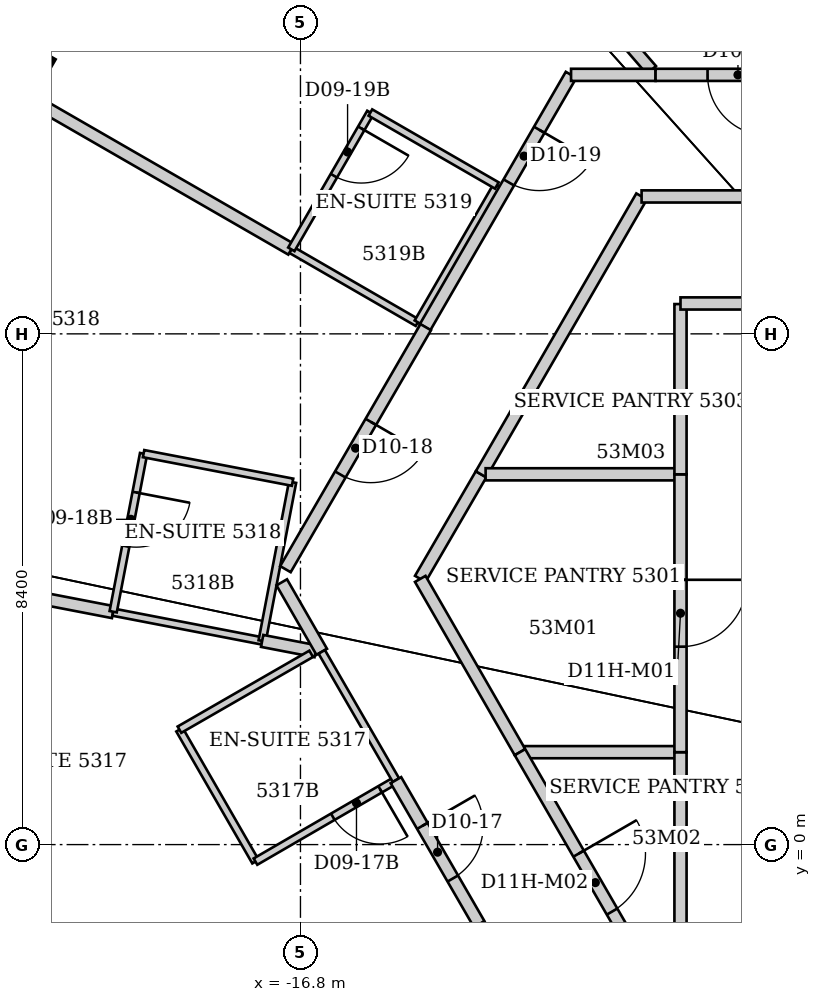
"""IFC4 building model, lengths in metres.
Left out: names, types, materials, properties, quantities, classifications, styles, units other than length and angle.
Written with IfcOpenShell. Run it as: python <this file> out.ifc"""

import sys

from ifc_helpers import new_model, si_unit, direction, frame, frame_2d, origin, origin_2d, place, context, subcontext, project, spatial, rectangle, extrude, element, fill, save


model = new_model("IFC4")
c1 = context("Model", 3, precision=1e-05, world=origin(), true_north=direction((0.0, 1.0)))
c2 = subcontext(c1, "Body", "Model", "MODEL_VIEW")
j1 = project(units=[si_unit("LENGTHUNIT", "METRE"), si_unit("PLANEANGLEUNIT", "RADIAN")], contexts=[c1])
p1 = place(None, origin())
s1 = spatial("IfcSite", under=j1, at=p1, CompositionType="ELEMENT")
p2 = place(p1, origin())
s2 = spatial("IfcBuilding", under=s1, at=p2, CompositionType="ELEMENT")
p3 = place(p2, frame((0.0, 0.0, 213.6)))
s3 = spatial("IfcBuildingStorey", under=s2, at=p3, CompositionType="ELEMENT", Elevation=213.6)
for number, where, z_axis, x_axis in (
    (1, (-21.85, -1.956, 0.0), (0.0, 0.0, 1.0), (-0.866, -0.5, 0.0)),
    (2, (-21.88, 12.633, 0.0), (0.0, 0.0, 1.0), (-0.866, 0.5, 0.0)),
):
    element("IfcColumn", number, at=place(p3, frame(where, z_axis=z_axis, x_axis=x_axis)), inside=s3, PredefinedType="COLUMN", context=c2, shape_type="SweptSolid", body=[
        extrude(rectangle(XDim=1.5, YDim=1.5, at=origin_2d()), origin(), (0.0, 0.0, 1.0), 3.8),
    ])
p4 = place(p3, frame((-27.041, 5.204, 0.0), z_axis=(0.0, 0.0, 1.0), x_axis=(0.981883480928, -0.189485698355, 0.0)))
e3 = element("IfcWall", 3, at=p4, inside=s3, PredefinedType="PARTITIONING", context=c2, shape_type="SweptSolid", body=[
    extrude(rectangle(XDim=7.291, YDim=0.2, at=frame_2d((3.646, 0.0))), origin(), (0.0, 0.0, 1.0), 3.64),
])
p5 = place(p3, frame((-19.881, 3.823, 0.0), z_axis=(0.0, 0.0, 1.0), x_axis=(0.981896775229, -0.189416796496, 0.0)))
e4 = element("IfcWall", 4, at=p5, inside=s3, PredefinedType="PARTITIONING", context=c2, shape_type="SweptSolid", body=[
    extrude(rectangle(XDim=2.497, YDim=0.12, at=frame_2d((1.248, 0.0))), origin(), (0.0, 0.0, 1.0), 3.64),
])
p6 = place(p3, frame((-19.38, 6.43, 0.0), z_axis=(0.0, 0.0, 1.0), x_axis=(-0.18885765444, -0.982004473696, 0.0)))
e5 = element("IfcWall", 5, at=p6, inside=s3, PredefinedType="PARTITIONING", context=c2, shape_type="SweptSolid", body=[
    extrude(rectangle(XDim=2.647, YDim=0.12, at=frame_2d((1.324, 0.0))), origin(), (0.0, 0.0, 1.0), 3.64),
])
p7 = place(p6, frame((0.65, 0.0, 0.0)))
e6 = element("IfcOpeningElement", 6, at=p7, cuts=e5, PredefinedType="OPENING", context=c2, shape_type="SweptSolid", body=[
    extrude(rectangle(XDim=0.9, YDim=2.03, at=frame_2d((0.45, 1.015))), frame((0.0, 0.06, 0.0), z_axis=(0.0, -1.0, 0.0), x_axis=(1.0, 0.0, 0.0)), (0.0, 0.0, 1.0), 0.12),
])
p8 = place(p3, frame((-18.79, 1.89, 0.0), z_axis=(0.0, 0.0, 1.0), x_axis=(0.499159685399, -0.866510016372, 0.0)))
e7 = element("IfcWall", 7, at=p8, inside=s3, PredefinedType="PARTITIONING", context=c2, shape_type="SweptSolid", body=[
    extrude(rectangle(XDim=2.504, YDim=0.12, at=frame_2d((1.252, 0.0))), origin(), (0.0, 0.0, 1.0), 3.64),
])
p9 = place(p3, frame((-17.54, -0.28, 0.0), z_axis=(0.0, 0.0, 1.0), x_axis=(0.86498992408, 0.501789229896, 0.0)))
e8 = element("IfcWall", 8, at=p9, inside=s3, PredefinedType="PARTITIONING", context=c2, shape_type="SweptSolid", body=[
    extrude(rectangle(XDim=2.671, YDim=0.12, at=frame_2d((1.335, 0.0))), origin(), (0.0, 0.0, 1.0), 3.64),
])
p10 = place(p9, frame((1.47, 0.0, 0.0)))
e9 = element("IfcOpeningElement", 9, at=p10, cuts=e8, PredefinedType="OPENING", context=c2, shape_type="SweptSolid", body=[
    extrude(rectangle(XDim=0.9, YDim=2.03, at=frame_2d((0.45, 1.015))), frame((0.0, 0.06, 0.0), z_axis=(0.0, -1.0, 0.0), x_axis=(1.0, 0.0, 0.0)), (0.0, 0.0, 1.0), 0.12),
])
p11 = place(p3, frame((-17.43, 3.35, 0.0), z_axis=(0.0, 0.0, 1.0), x_axis=(0.188159009227, 0.982138578433, 0.0)))
e10 = element("IfcWall", 10, at=p11, inside=s3, PredefinedType="PARTITIONING", context=c2, shape_type="SweptSolid", body=[
    extrude(rectangle(XDim=2.657, YDim=0.12, at=frame_2d((1.329, 0.0))), origin(), (0.0, 0.0, 1.0), 3.64),
])
p12 = place(p3, frame((-17.43, 3.35, 0.0), z_axis=(0.0, 0.0, 1.0), x_axis=(0.981858463983, -0.189615286052, 0.0)))
e11 = element("IfcWall", 11, at=p12, inside=s3, PredefinedType="PARTITIONING", context=c2, shape_type="SweptSolid", body=[
    extrude(rectangle(XDim=0.896, YDim=0.2, at=frame_2d((0.448, 0.0))), origin(), (0.0, 0.0, 1.0), 3.64),
])
p13 = place(p3, frame((-17.108, 4.314, 0.0), z_axis=(0.0, 0.0, 1.0), x_axis=(0.498488506644, -0.866896307954, 0.0)))
e12 = element("IfcWall", 12, at=p13, inside=s3, PredefinedType="PARTITIONING", context=c2, shape_type="SweptSolid", body=[
    extrude(rectangle(XDim=1.319, YDim=0.2, at=frame_2d((0.66, 0.0))), origin(), (0.0, 0.0, 1.0), 3.64),
])
p14 = place(p3, frame((-16.954, 9.783, 0.0), z_axis=(0.0, 0.0, 1.0), x_axis=(0.865862137391, -0.500282679124, 0.0)))
e13 = element("IfcWall", 13, at=p14, inside=s3, PredefinedType="PARTITIONING", context=c2, shape_type="SweptSolid", body=[
    extrude(rectangle(XDim=2.401, YDim=0.12, at=frame_2d((1.201, 0.0))), origin(), (0.0, 0.0, 1.0), 2.878),
])
p15 = place(p3, frame((-16.95, 9.79, 0.0), z_axis=(0.0, 0.0, 1.0), x_axis=(-0.866371236465, 0.499400521251, 0.0)))
e14 = element("IfcWall", 14, at=p15, inside=s3, PredefinedType="PARTITIONING", context=c2, shape_type="SweptSolid", body=[
    extrude(rectangle(XDim=6.829, YDim=0.2, at=frame_2d((3.414, 0.0))), origin(), (0.0, 0.0, 1.0), 2.878),
])
p16 = place(p3, frame((-16.93, 5.96, 0.0), z_axis=(0.0, 0.0, 1.0), x_axis=(-0.982097071605, 0.18837553436, 0.0)))
e15 = element("IfcWall", 15, at=p16, inside=s3, PredefinedType="PARTITIONING", context=c2, shape_type="SweptSolid", body=[
    extrude(rectangle(XDim=2.495, YDim=0.12, at=frame_2d((1.248, 0.0))), origin(), (0.0, 0.0, 1.0), 3.64),
])
p17 = place(p3, frame((-16.624, 3.138, 0.0), z_axis=(0.0, 0.0, 1.0), x_axis=(-0.866525185869, -0.499133351175, 0.0)))
e16 = element("IfcWall", 16, at=p17, inside=s3, PredefinedType="PARTITIONING", context=c2, shape_type="SweptSolid", body=[
    extrude(rectangle(XDim=2.5, YDim=0.12, at=frame_2d((1.25, 0.0))), origin(), (0.0, 0.0, 1.0), 3.038),
])
p18 = place(p3, frame((-16.45, 3.17, 0.0), z_axis=(0.0, 0.0, 1.0), x_axis=(0.500566296323, -0.865698205488, 0.0)))
e17 = element("IfcWall", 17, at=p18, inside=s3, PredefinedType="PARTITIONING", context=c2, shape_type="SweptSolid", body=[
    extrude(rectangle(XDim=2.437, YDim=0.12, at=frame_2d((1.219, 0.0))), origin(), (0.0, 0.0, 1.0), 3.64),
])
p19 = place(p3, frame((-16.13, -2.62, 0.0), z_axis=(0.0, 0.0, 1.0), x_axis=(0.866114241029, 0.499846097802, 0.0)))
e18 = element("IfcWall", 18, at=p19, inside=s3, PredefinedType="PARTITIONING", context=c2, shape_type="SweptSolid", body=[
    extrude(rectangle(XDim=2.621, YDim=0.12, at=frame_2d((1.311, 0.0))), origin(), (0.0, 0.0, 1.0), 3.64),
])
p20 = place(p3, frame((-15.65, 12.04, 0.0), z_axis=(0.0, 0.0, 1.0), x_axis=(-0.500291685314, -0.865856933682, 0.0)))
e19 = element("IfcWall", 19, at=p20, inside=s3, PredefinedType="PARTITIONING", context=c2, shape_type="SweptSolid", body=[
    extrude(rectangle(XDim=2.599, YDim=0.12, at=frame_2d((1.299, 0.0))), origin(), (0.0, 0.0, 1.0), 3.64),
])
p21 = place(p20, frame((0.3, 0.0, 0.0)))
e20 = element("IfcOpeningElement", 20, at=p21, cuts=e19, PredefinedType="OPENING", context=c2, shape_type="SweptSolid", body=[
    extrude(rectangle(XDim=0.9, YDim=2.03, at=frame_2d((0.45, 1.015))), frame((0.0, 0.06, 0.0), z_axis=(0.0, -1.0, 0.0), x_axis=(1.0, 0.0, 0.0)), (0.0, 0.0, 1.0), 0.12),
])
p22 = place(p3, frame((-15.23, 1.06, 0.0), z_axis=(0.0, 0.0, 1.0), x_axis=(0.500406860043, -0.865790375565, 0.0)))
e21 = element("IfcWall", 21, at=p22, inside=s3, PredefinedType="PARTITIONING", context=c2, shape_type="SweptSolid", body=[
    extrude(rectangle(XDim=2.738, YDim=0.2, at=frame_2d((1.369, 0.0))), origin(), (0.0, 0.0, 1.0), 3.64),
])
p23 = place(p22, frame((0.869, 0.0, 0.0)))
e22 = element("IfcOpeningElement", 22, at=p23, cuts=e21, PredefinedType="OPENING", context=c2, shape_type="SweptSolid", body=[
    extrude(rectangle(XDim=1.0, YDim=2.13, at=frame_2d((0.5, 1.065))), frame((0.0, 0.1, 0.0), z_axis=(0.0, -1.0, 0.0), x_axis=(1.0, 0.0, 0.0)), (0.0, 0.0, 1.0), 0.2),
])
p24 = place(p3, frame((-14.87, 8.59, 0.0), z_axis=(0.0, 0.0, 1.0), x_axis=(0.500291685314, 0.865856933682, 0.0)))
e23 = element("IfcWall", 23, at=p24, inside=s3, PredefinedType="PARTITIONING", context=c2, shape_type="SweptSolid", body=[
    extrude(rectangle(XDim=2.599, YDim=0.12, at=frame_2d((1.299, 0.0))), origin(), (0.0, 0.0, 1.0), 3.64),
])
p25 = place(p3, frame((-14.83, 4.37, 0.0), z_axis=(0.0, 0.0, 1.0), x_axis=(0.502626855825, 0.864503466623, 0.0)))
e24 = element("IfcWall", 24, at=p25, inside=s3, PredefinedType="PARTITIONING", context=c2, shape_type="SweptSolid", body=[
    extrude(rectangle(XDim=1.99, YDim=0.2, at=frame_2d((0.995, 0.0))), origin(), (0.0, 0.0, 1.0), 3.64),
])
p26 = place(p3, frame((-14.827, 8.554, 0.0), z_axis=(0.0, 0.0, 1.0), x_axis=(0.865865073245, -0.500277597875, 0.0)))
e25 = element("IfcWall", 25, at=p26, inside=s3, PredefinedType="PARTITIONING", context=c2, shape_type="SweptSolid", body=[
    extrude(rectangle(XDim=0.089, YDim=0.2, at=frame_2d((0.044, 0.0))), origin(), (0.0, 0.0, 1.0), 3.64),
])
p27 = place(p3, frame((-14.75, 8.51, 0.0), z_axis=(0.0, 0.0, 1.0), x_axis=(0.500618647881, 0.86566793252, 0.0)))
e26 = element("IfcWall", 26, at=p27, inside=s3, PredefinedType="PARTITIONING", context=c2, shape_type="SweptSolid", body=[
    extrude(rectangle(XDim=4.794, YDim=0.2, at=frame_2d((2.397, 0.0))), origin(), (0.0, 0.0, 1.0), 3.64),
])
p28 = place(p27, frame((2.75, 0.0, 0.0)))
e27 = element("IfcOpeningElement", 27, at=p28, cuts=e26, PredefinedType="OPENING", context=c2, shape_type="SweptSolid", body=[
    extrude(rectangle(XDim=1.0, YDim=2.13, at=frame_2d((0.5, 1.065))), frame((0.0, 0.1, 0.0), z_axis=(0.0, -1.0, 0.0), x_axis=(1.0, 0.0, 0.0)), (0.0, 0.0, 1.0), 0.2),
])
p29 = place(p3, frame((-14.74, 8.51, 0.0), z_axis=(0.0, 0.0, 1.0), x_axis=(-0.501513165407, -0.865150012959, 0.0)))
e28 = element("IfcWall", 28, at=p29, inside=s3, PredefinedType="PARTITIONING", context=c2, shape_type="SweptSolid", body=[
    extrude(rectangle(XDim=4.6, YDim=0.2, at=frame_2d((2.3, 0.0))), origin(), (0.0, 0.0, 1.0), 3.64),
])
p30 = place(p29, frame((1.8, 0.0, 0.0)))
e29 = element("IfcOpeningElement", 29, at=p30, cuts=e28, PredefinedType="OPENING", context=c2, shape_type="SweptSolid", body=[
    extrude(rectangle(XDim=1.0, YDim=2.13, at=frame_2d((0.5, 1.065))), frame((0.0, 0.1, 0.0), z_axis=(0.0, -1.0, 0.0), x_axis=(1.0, 0.0, 0.0)), (0.0, 0.0, 1.0), 0.2),
])
p31 = place(p3, frame((-13.83, 6.09, 0.0), z_axis=(0.0, 0.0, 1.0), x_axis=(0.500248310865, 0.865881993967, 0.0)))
e30 = element("IfcWall", 30, at=p31, inside=s3, PredefinedType="PARTITIONING", context=c2, shape_type="SweptSolid", body=[
    extrude(rectangle(XDim=5.278, YDim=0.2, at=frame_2d((2.639, 0.0))), origin(), (0.0, 0.0, 1.0), 3.64),
])
p32 = place(p3, frame((-13.755, 6.09, 0.0), z_axis=(0.0, 0.0, 1.0), x_axis=(1.0, 0.0, 0.0)))
e31 = element("IfcWall", 31, at=p32, inside=s3, PredefinedType="PARTITIONING", context=c2, shape_type="SweptSolid", body=[
    extrude(rectangle(XDim=3.195, YDim=0.2, at=frame_2d((1.597, 0.0))), origin(), (0.0, 0.0, 1.0), 3.64),
])
p33 = place(p3, frame((-13.57, 10.84, 0.0), z_axis=(0.0, 0.0, 1.0), x_axis=(-0.866177122335, 0.499737123639, 0.0)))
e32 = element("IfcWall", 32, at=p33, inside=s3, PredefinedType="PARTITIONING", context=c2, shape_type="SweptSolid", body=[
    extrude(rectangle(XDim=2.401, YDim=0.12, at=frame_2d((1.201, 0.0))), origin(), (0.0, 0.0, 1.0), 3.64),
])
p34 = place(p3, frame((-13.19, 1.52, 0.0), z_axis=(0.0, 0.0, 1.0), x_axis=(-0.498775186059, 0.866731396554, 0.0)))
e33 = element("IfcWall", 33, at=p34, inside=s3, PredefinedType="PARTITIONING", context=c2, shape_type="SweptSolid", body=[
    extrude(rectangle(XDim=3.288, YDim=0.2, at=frame_2d((1.644, 0.0))), origin(), (0.0, 0.0, 1.0), 3.64),
])
p35 = place(p3, frame((-11.19, 10.66, 0.0), z_axis=(0.0, 0.0, 1.0), x_axis=(1.0, 0.0, 0.0)))
e34 = element("IfcWall", 34, at=p35, inside=s3, PredefinedType="PARTITIONING", context=c2, shape_type="SweptSolid", body=[
    extrude(rectangle(XDim=6.59, YDim=0.2, at=frame_2d((3.295, 0.0))), origin(), (0.0, 0.0, 1.0), 3.64),
])
p36 = place(p35, frame((2.745, 0.0, 0.0)))
e35 = element("IfcOpeningElement", 35, at=p36, cuts=e34, PredefinedType="OPENING", context=c2, shape_type="SweptSolid", body=[
    extrude(rectangle(XDim=1.1, YDim=2.2, at=frame_2d((0.55, 1.1))), frame((0.0, 0.1, 0.0), z_axis=(0.0, -1.0, 0.0), x_axis=(1.0, 0.0, 0.0)), (0.0, 0.0, 1.0), 0.2),
])
p37 = place(p3, frame((-11.029, 12.74, 0.0), z_axis=(0.0, 0.0, 1.0), x_axis=(-0.654429261747, 0.756123231603, 0.0)))
e36 = element("IfcWall", 36, at=p37, inside=s3, PredefinedType="PARTITIONING", context=c2, shape_type="SweptSolid", body=[
    extrude(rectangle(XDim=10.683, YDim=0.2, at=frame_2d((5.342, 0.0))), origin(), (0.0, 0.0, 1.0), 3.64),
])
p38 = place(p3, frame((-10.96, 12.66, 0.0), z_axis=(0.0, 0.0, 1.0), x_axis=(-1.0, 0.0, 0.0)))
e37 = element("IfcWall", 37, at=p38, inside=s3, PredefinedType="PARTITIONING", context=c2, shape_type="SweptSolid", body=[
    extrude(rectangle(XDim=1.39, YDim=0.2, at=frame_2d((0.695, 0.0))), origin(), (0.0, 0.0, 1.0), 3.64),
])
p39 = place(p3, frame((-10.56, 1.52, 0.0), z_axis=(0.0, 0.0, 1.0), x_axis=(-1.0, 0.0, 0.0)))
e38 = element("IfcWall", 38, at=p39, inside=s3, PredefinedType="PARTITIONING", context=c2, shape_type="SweptSolid", body=[
    extrude(rectangle(XDim=2.56, YDim=0.2, at=frame_2d((1.28, 0.0))), origin(), (0.0, 0.0, 1.0), 3.64),
])
p40 = place(p3, frame((-10.55, -3.05, 0.0), z_axis=(0.0, 0.0, 1.0), x_axis=(-0.500193590286, 0.865913605527, 0.0)))
e39 = element("IfcWall", 39, at=p40, inside=s3, PredefinedType="PARTITIONING", context=c2, shape_type="SweptSolid", body=[
    extrude(rectangle(XDim=5.278, YDim=0.2, at=frame_2d((2.639, 0.0))), origin(), (0.0, 0.0, 1.0), 3.64),
])
p41 = place(p40, frame((2.25, 0.0, 0.0)))
e40 = element("IfcOpeningElement", 40, at=p41, cuts=e39, PredefinedType="OPENING", context=c2, shape_type="SweptSolid", body=[
    extrude(rectangle(XDim=1.1, YDim=2.2, at=frame_2d((0.55, 1.1))), frame((0.0, 0.1, 0.0), z_axis=(0.0, -1.0, 0.0), x_axis=(1.0, 0.0, 0.0)), (0.0, 0.0, 1.0), 0.2),
])
p42 = place(p3, frame((-10.55, 1.52, 0.0), z_axis=(0.0, 0.0, 1.0), x_axis=(0.0, -1.0, 0.0)))
e41 = element("IfcWall", 41, at=p42, inside=s3, PredefinedType="PARTITIONING", context=c2, shape_type="SweptSolid", body=[
    extrude(rectangle(XDim=4.375, YDim=0.2, at=frame_2d((2.188, 0.0))), origin(), (0.0, 0.0, 1.0), 3.64),
])
p43 = place(p3, frame((-10.55, 6.09, 0.0), z_axis=(0.0, 0.0, 1.0), x_axis=(0.0, -1.0, 0.0)))
e42 = element("IfcWall", 42, at=p43, inside=s3, PredefinedType="PARTITIONING", context=c2, shape_type="SweptSolid", body=[
    extrude(rectangle(XDim=4.57, YDim=0.2, at=frame_2d((2.285, 0.0))), origin(), (0.0, 0.0, 1.0), 3.64),
])
p44 = place(p43, frame((1.735, 0.0, 0.0)))
e43 = element("IfcOpeningElement", 43, at=p44, cuts=e42, PredefinedType="OPENING", context=c2, shape_type="SweptSolid", body=[
    extrude(rectangle(XDim=1.1, YDim=2.2, at=frame_2d((0.55, 1.1))), frame((0.0, 0.1, 0.0), z_axis=(0.0, -1.0, 0.0), x_axis=(1.0, 0.0, 0.0)), (0.0, 0.0, 1.0), 0.2),
])
p45 = place(p3, frame((-10.55, 8.89, 0.0), z_axis=(0.0, 0.0, 1.0), x_axis=(0.0, -1.0, 0.0)))
e44 = element("IfcWall", 44, at=p45, inside=s3, PredefinedType="PARTITIONING", context=c2, shape_type="SweptSolid", body=[
    extrude(rectangle(XDim=2.8, YDim=0.2, at=frame_2d((1.4, 0.0))), origin(), (0.0, 0.0, 1.0), 3.64),
])
p46 = place(p3, frame((-8.25, 12.66, 0.0), z_axis=(0.0, 0.0, 1.0), x_axis=(-1.0, 0.0, 0.0)))
e45 = element("IfcWall", 45, at=p46, inside=s3, PredefinedType="PARTITIONING", context=c2, shape_type="SweptSolid", body=[
    extrude(rectangle(XDim=2.71, YDim=0.2, at=frame_2d((1.355, 0.0))), origin(), (0.0, 0.0, 1.0), 3.64),
])
p47 = place(p46, frame((0.855, 0.0, 0.0)))
e46 = element("IfcOpeningElement", 46, at=p47, cuts=e45, PredefinedType="OPENING", context=c2, shape_type="SweptSolid", body=[
    extrude(rectangle(XDim=1.0, YDim=2.13, at=frame_2d((0.5, 1.065))), frame((0.0, 0.1, 0.0), z_axis=(0.0, -1.0, 0.0), x_axis=(1.0, 0.0, 0.0)), (0.0, 0.0, 1.0), 0.2),
])
p48 = place(p3, frame((-4.6, 8.9, 0.0), z_axis=(0.0, 0.0, 1.0), x_axis=(-1.0, 0.0, 0.0)))
e47 = element("IfcWall", 47, at=p48, inside=s3, PredefinedType="PARTITIONING", context=c2, shape_type="SweptSolid", body=[
    extrude(rectangle(XDim=5.95, YDim=0.2, at=frame_2d((2.975, 0.0))), origin(), (0.0, 0.0, 1.0), 3.64),
])
p49 = place(p47, origin())
e48 = element("IfcDoor", 48, at=p49, inside=s3, OperationType="SINGLE_SWING_LEFT", PredefinedType="DOOR", context=c2, shape_type="SweptSolid", body=[
    extrude(rectangle(XDim=1.0, YDim=2.13, at=frame_2d((0.5, 1.065))), frame((0.0, 0.025, 0.0), z_axis=(0.0, -1.0, 0.0), x_axis=(1.0, 0.0, 0.0)), (0.0, 0.0, 1.0), 0.05),
])
fill(e46, e48)
p50 = place(p23, origin())
e49 = element("IfcDoor", 49, at=p50, inside=s3, OperationType="SINGLE_SWING_LEFT", PredefinedType="DOOR", context=c2, shape_type="SweptSolid", body=[
    extrude(rectangle(XDim=1.0, YDim=2.13, at=frame_2d((0.5, 1.065))), frame((0.0, 0.025, 0.0), z_axis=(0.0, -1.0, 0.0), x_axis=(1.0, 0.0, 0.0)), (0.0, 0.0, 1.0), 0.05),
])
fill(e22, e49)
p51 = place(p10, origin())
e50 = element("IfcDoor", 50, at=p51, inside=s3, OperationType="SINGLE_SWING_RIGHT", PredefinedType="DOOR", context=c2, shape_type="SweptSolid", body=[
    extrude(rectangle(XDim=0.9, YDim=2.03, at=frame_2d((0.45, 1.015))), frame((0.0, 0.025, 0.0), z_axis=(0.0, -1.0, 0.0), x_axis=(1.0, 0.0, 0.0)), (0.0, 0.0, 1.0), 0.05),
])
fill(e9, e50)
p52 = place(p30, origin())
e51 = element("IfcDoor", 51, at=p52, inside=s3, OperationType="SINGLE_SWING_LEFT", PredefinedType="DOOR", context=c2, shape_type="SweptSolid", body=[
    extrude(rectangle(XDim=1.0, YDim=2.13, at=frame_2d((0.5, 1.065))), frame((0.0, 0.025, 0.0), z_axis=(0.0, -1.0, 0.0), x_axis=(1.0, 0.0, 0.0)), (0.0, 0.0, 1.0), 0.05),
])
fill(e29, e51)
p53 = place(p7, origin())
e52 = element("IfcDoor", 52, at=p53, inside=s3, OperationType="SINGLE_SWING_LEFT", PredefinedType="DOOR", context=c2, shape_type="SweptSolid", body=[
    extrude(rectangle(XDim=0.9, YDim=2.03, at=frame_2d((0.45, 1.015))), frame((0.0, 0.025, 0.0), z_axis=(0.0, -1.0, 0.0), x_axis=(1.0, 0.0, 0.0)), (0.0, 0.0, 1.0), 0.05),
])
fill(e6, e52)
p54 = place(p28, origin())
e53 = element("IfcDoor", 53, at=p54, inside=s3, OperationType="SINGLE_SWING_RIGHT", PredefinedType="DOOR", context=c2, shape_type="SweptSolid", body=[
    extrude(rectangle(XDim=1.0, YDim=2.13, at=frame_2d((0.5, 1.065))), frame((0.0, 0.025, 0.0), z_axis=(0.0, -1.0, 0.0), x_axis=(1.0, 0.0, 0.0)), (0.0, 0.0, 1.0), 0.05),
])
fill(e27, e53)
p55 = place(p21, origin())
e54 = element("IfcDoor", 54, at=p55, inside=s3, OperationType="SINGLE_SWING_LEFT", PredefinedType="DOOR", context=c2, shape_type="SweptSolid", body=[
    extrude(rectangle(XDim=0.9, YDim=2.03, at=frame_2d((0.45, 1.015))), frame((0.0, 0.025, 0.0), z_axis=(0.0, -1.0, 0.0), x_axis=(1.0, 0.0, 0.0)), (0.0, 0.0, 1.0), 0.05),
])
fill(e20, e54)
p56 = place(p44, origin())
e55 = element("IfcDoor", 55, at=p56, inside=s3, OperationType="SINGLE_SWING_LEFT", PredefinedType="DOOR", context=c2, shape_type="SweptSolid", body=[
    extrude(rectangle(XDim=1.1, YDim=2.2, at=frame_2d((0.55, 1.1))), frame((0.0, 0.025, 0.0), z_axis=(0.0, -1.0, 0.0), x_axis=(1.0, 0.0, 0.0)), (0.0, 0.0, 1.0), 0.05),
])
fill(e43, e55)
p57 = place(p41, origin())
e56 = element("IfcDoor", 56, at=p57, inside=s3, OperationType="SINGLE_SWING_RIGHT", PredefinedType="DOOR", context=c2, shape_type="SweptSolid", body=[
    extrude(rectangle(XDim=1.1, YDim=2.2, at=frame_2d((0.55, 1.1))), frame((0.0, 0.025, 0.0), z_axis=(0.0, -1.0, 0.0), x_axis=(1.0, 0.0, 0.0)), (0.0, 0.0, 1.0), 0.05),
])
fill(e40, e56)
save(model, sys.argv[1])
